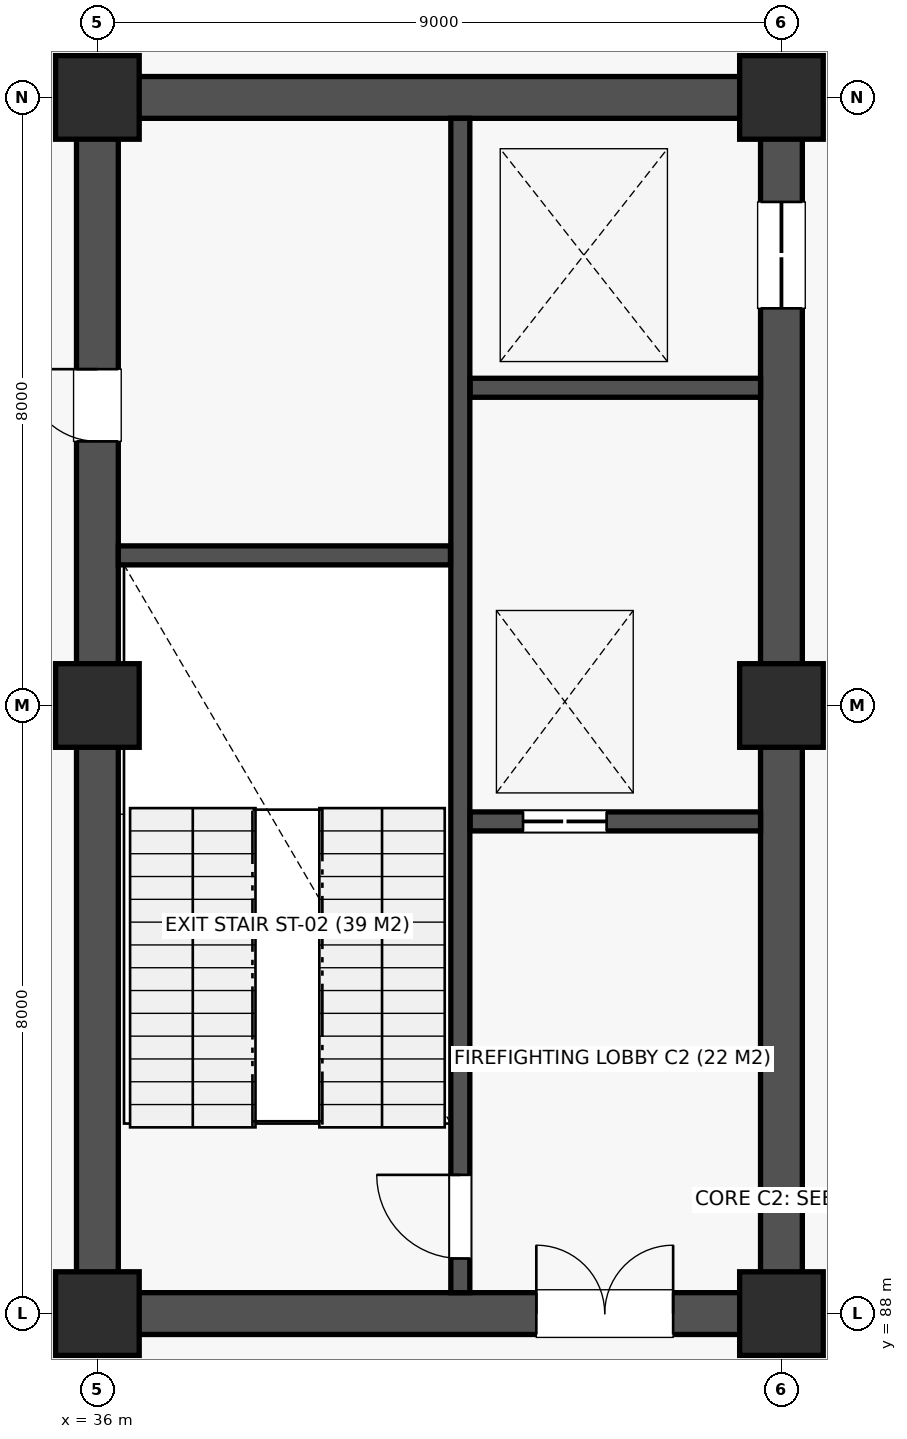
"""IFC4 building model, lengths in metres.
Left out: names, types, materials, properties, quantities, classifications, styles, units other than length and angle.
Written with IfcOpenShell. Run it as: python <this file> out.ifc"""

import sys

from ifc_helpers import new_model, si_unit, direction, frame, frame_2d, origin, origin_2d, place, context, subcontext, project, spatial, rectangle, extrude, element, fill, save


model = new_model("IFC4")
c1 = context("Model", 3, precision=1e-05, world=origin(), true_north=direction((0.0, 1.0)))
c2 = subcontext(c1, "Body", "Model", "MODEL_VIEW")
j1 = project(units=[si_unit("LENGTHUNIT", "METRE"), si_unit("PLANEANGLEUNIT", "RADIAN")], contexts=[c1])
p1 = place(None, origin())
s1 = spatial("IfcSite", under=j1, at=p1, CompositionType="ELEMENT")
p2 = place(p1, origin())
s2 = spatial("IfcBuilding", under=s1, at=p2, CompositionType="ELEMENT")
p3 = place(p2, frame((0.0, 0.0, -4.5)))
s3 = spatial("IfcBuildingStorey", under=s2, at=p3, CompositionType="ELEMENT", Elevation=-4.5)
for number, where, z_axis, x_axis in (
    (1, (36.0, 88.0, 0.0), (0.0, 0.0, 1.0), (1.0, 0.0, 0.0)),
    (2, (36.0, 96.0, 0.0), (0.0, 0.0, 1.0), (1.0, 0.0, 0.0)),
    (3, (36.0, 104.0, 0.0), (0.0, 0.0, 1.0), (1.0, 0.0, 0.0)),
    (4, (45.0, 88.0, 0.0), (0.0, 0.0, 1.0), (1.0, 0.0, 0.0)),
    (5, (45.0, 96.0, 0.0), (0.0, 0.0, 1.0), (1.0, 0.0, 0.0)),
    (6, (45.0, 104.0, 0.0), (0.0, 0.0, 1.0), (1.0, 0.0, 0.0)),
):
    element("IfcColumn", number, at=place(p3, frame(where, z_axis=z_axis, x_axis=x_axis)), inside=s3, PredefinedType="COLUMN", context=c2, shape_type="SweptSolid", body=[
        extrude(rectangle(XDim=1.1, YDim=1.1, at=origin_2d()), origin(), (0.0, 0.0, 1.0), 4.5),
    ])
p4 = place(p3, frame((36.275, 88.0, 0.0), z_axis=(0.0, 0.0, 1.0), x_axis=(1.0, 0.0, 0.0)))
e7 = element("IfcWall", 7, at=p4, inside=s3, PredefinedType="SHEAR", context=c2, shape_type="SweptSolid", body=[
    extrude(rectangle(XDim=8.45, YDim=0.55, at=frame_2d((4.225, 0.0))), origin(), (0.0, 0.0, 1.0), 4.15),
])
p5 = place(p4, frame((5.5, 0.0, 0.0)))
e8 = element("IfcOpeningElement", 8, at=p5, cuts=e7, PredefinedType="OPENING", context=c2, shape_type="SweptSolid", body=[
    extrude(rectangle(XDim=1.8, YDim=2.18, at=frame_2d((0.9, 1.09))), frame((0.0, 0.287, 0.0), z_axis=(0.0, -1.0, 0.0), x_axis=(1.0, 0.0, 0.0)), (0.0, 0.0, 1.0), 0.574),
])
p6 = place(p3, frame((36.275, 104.0, 0.0), z_axis=(0.0, 0.0, 1.0), x_axis=(1.0, 0.0, 0.0)))
e9 = element("IfcWall", 9, at=p6, inside=s3, PredefinedType="SHEAR", context=c2, shape_type="SweptSolid", body=[
    extrude(rectangle(XDim=8.45, YDim=0.55, at=frame_2d((4.225, 0.0))), origin(), (0.0, 0.0, 1.0), 4.15),
])
p7 = place(p3, frame((36.0, 88.275, 0.0), z_axis=(0.0, 0.0, 1.0), x_axis=(0.0, 1.0, 0.0)))
e10 = element("IfcWall", 10, at=p7, inside=s3, PredefinedType="SHEAR", context=c2, shape_type="SweptSolid", body=[
    extrude(rectangle(XDim=15.45, YDim=0.55, at=frame_2d((7.725, 0.0))), origin(), (0.0, 0.0, 1.0), 4.15),
])
p8 = place(p7, frame((11.2, 0.0, 0.0)))
e11 = element("IfcOpeningElement", 11, at=p8, cuts=e10, PredefinedType="OPENING", context=c2, shape_type="SweptSolid", body=[
    extrude(rectangle(XDim=0.95, YDim=2.1, at=frame_2d((0.475, 1.05))), frame((0.0, 0.287, 0.0), z_axis=(0.0, -1.0, 0.0), x_axis=(1.0, 0.0, 0.0)), (0.0, 0.0, 1.0), 0.574),
])
p9 = place(p3, frame((45.0, 88.275, 0.0), z_axis=(0.0, 0.0, 1.0), x_axis=(0.0, 1.0, 0.0)))
e12 = element("IfcWall", 12, at=p9, inside=s3, PredefinedType="SHEAR", context=c2, shape_type="SweptSolid", body=[
    extrude(rectangle(XDim=15.45, YDim=0.55, at=frame_2d((7.725, 0.0))), origin(), (0.0, 0.0, 1.0), 4.15),
])
p10 = place(p9, frame((12.95, 0.0, 0.0)))
e13 = element("IfcOpeningElement", 13, at=p10, cuts=e12, PredefinedType="OPENING", context=c2, shape_type="SweptSolid", body=[
    extrude(rectangle(XDim=1.4, YDim=2.2, at=frame_2d((0.7, 1.1))), frame((0.0, 0.287, 0.0), z_axis=(0.0, -1.0, 0.0), x_axis=(1.0, 0.0, 0.0)), (0.0, 0.0, 1.0), 0.574),
])
p11 = place(p3, frame((40.775, 88.275, 0.0), z_axis=(0.0, 0.0, 1.0), x_axis=(0.0, 1.0, 0.0)))
e14 = element("IfcWall", 14, at=p11, inside=s3, PredefinedType="SOLIDWALL", context=c2, shape_type="SweptSolid", body=[
    extrude(rectangle(XDim=15.45, YDim=0.25, at=frame_2d((7.725, 0.0))), origin(), (0.0, 0.0, 1.0), 4.15),
])
p12 = place(p11, frame((0.45, 0.0, 0.0)))
e15 = element("IfcOpeningElement", 15, at=p12, cuts=e14, PredefinedType="OPENING", context=c2, shape_type="SweptSolid", body=[
    extrude(rectangle(XDim=1.1, YDim=2.15, at=frame_2d((0.55, 1.075))), frame((0.0, 0.137, 0.0), z_axis=(0.0, -1.0, 0.0), x_axis=(1.0, 0.0, 0.0)), (0.0, 0.0, 1.0), 0.274),
])
p13 = place(p3, frame((36.275, 97.975, 0.0), z_axis=(0.0, 0.0, 1.0), x_axis=(1.0, 0.0, 0.0)))
e16 = element("IfcWall", 16, at=p13, inside=s3, PredefinedType="SOLIDWALL", context=c2, shape_type="SweptSolid", body=[
    extrude(rectangle(XDim=4.37, YDim=0.25, at=frame_2d((2.185, 0.0))), origin(), (0.0, 0.0, 1.0), 4.15),
])
p14 = place(p3, frame((40.905, 94.475, 0.0), z_axis=(0.0, 0.0, 1.0), x_axis=(1.0, 0.0, 0.0)))
e17 = element("IfcWall", 17, at=p14, inside=s3, PredefinedType="SOLIDWALL", context=c2, shape_type="SweptSolid", body=[
    extrude(rectangle(XDim=3.82, YDim=0.25, at=frame_2d((1.91, 0.0))), origin(), (0.0, 0.0, 1.0), 4.15),
])
p15 = place(p14, frame((0.695, 0.0, 0.0)))
e18 = element("IfcOpeningElement", 18, at=p15, cuts=e17, PredefinedType="OPENING", context=c2, shape_type="SweptSolid", body=[
    extrude(rectangle(XDim=1.1, YDim=2.12, at=frame_2d((0.55, 1.06))), frame((0.0, 0.137, 0.0), z_axis=(0.0, -1.0, 0.0), x_axis=(1.0, 0.0, 0.0)), (0.0, 0.0, 1.0), 0.274),
])
p16 = place(p3, frame((40.905, 100.18, 0.0), z_axis=(0.0, 0.0, 1.0), x_axis=(1.0, 0.0, 0.0)))
e19 = element("IfcWall", 19, at=p16, inside=s3, PredefinedType="SOLIDWALL", context=c2, shape_type="SweptSolid", body=[
    extrude(rectangle(XDim=3.82, YDim=0.25, at=frame_2d((1.91, 0.0))), origin(), (0.0, 0.0, 1.0), 4.15),
])
p17 = place(p5, origin())
e20 = element("IfcDoor", 20, at=p17, inside=s3, OperationType="DOUBLE_DOOR_SINGLE_SWING", PredefinedType="DOOR", context=c2, shape_type="SweptSolid", body=[
    extrude(rectangle(XDim=1.8, YDim=2.18, at=frame_2d((0.9, 1.09))), frame((0.0, 0.025, 0.0), z_axis=(0.0, -1.0, 0.0), x_axis=(1.0, 0.0, 0.0)), (0.0, 0.0, 1.0), 0.05),
])
fill(e8, e20)
p18 = place(p12, origin())
e21 = element("IfcDoor", 21, at=p18, inside=s3, OperationType="SINGLE_SWING_RIGHT", PredefinedType="DOOR", context=c2, shape_type="SweptSolid", body=[
    extrude(rectangle(XDim=1.1, YDim=2.15, at=frame_2d((0.55, 1.075))), frame((0.0, 0.025, 0.0), z_axis=(0.0, -1.0, 0.0), x_axis=(1.0, 0.0, 0.0)), (0.0, 0.0, 1.0), 0.05),
])
fill(e15, e21)
p19 = place(p8, origin())
e22 = element("IfcDoor", 22, at=p19, inside=s3, OperationType="SINGLE_SWING_RIGHT", PredefinedType="DOOR", context=c2, shape_type="SweptSolid", body=[
    extrude(rectangle(XDim=0.95, YDim=2.1, at=frame_2d((0.475, 1.05))), frame((0.0, 0.025, 0.0), z_axis=(0.0, -1.0, 0.0), x_axis=(1.0, 0.0, 0.0)), (0.0, 0.0, 1.0), 0.05),
])
fill(e11, e22)
p20 = place(p15, origin())
e23 = element("IfcDoor", 23, at=p20, inside=s3, OperationType="DOUBLE_DOOR_SLIDING", PredefinedType="DOOR", context=c2, shape_type="SweptSolid", body=[
    extrude(rectangle(XDim=1.1, YDim=2.12, at=frame_2d((0.55, 1.06))), frame((0.0, 0.025, 0.0), z_axis=(0.0, -1.0, 0.0), x_axis=(1.0, 0.0, 0.0)), (0.0, 0.0, 1.0), 0.05),
])
fill(e18, e23)
p21 = place(p10, origin())
e24 = element("IfcDoor", 24, at=p21, inside=s3, OperationType="DOUBLE_DOOR_SLIDING", PredefinedType="DOOR", context=c2, shape_type="SweptSolid", body=[
    extrude(rectangle(XDim=1.4, YDim=2.2, at=frame_2d((0.7, 1.1))), frame((0.0, 0.025, 0.0), z_axis=(0.0, -1.0, 0.0), x_axis=(1.0, 0.0, 0.0)), (0.0, 0.0, 1.0), 0.05),
])
fill(e13, e24)
save(model, sys.argv[1])
